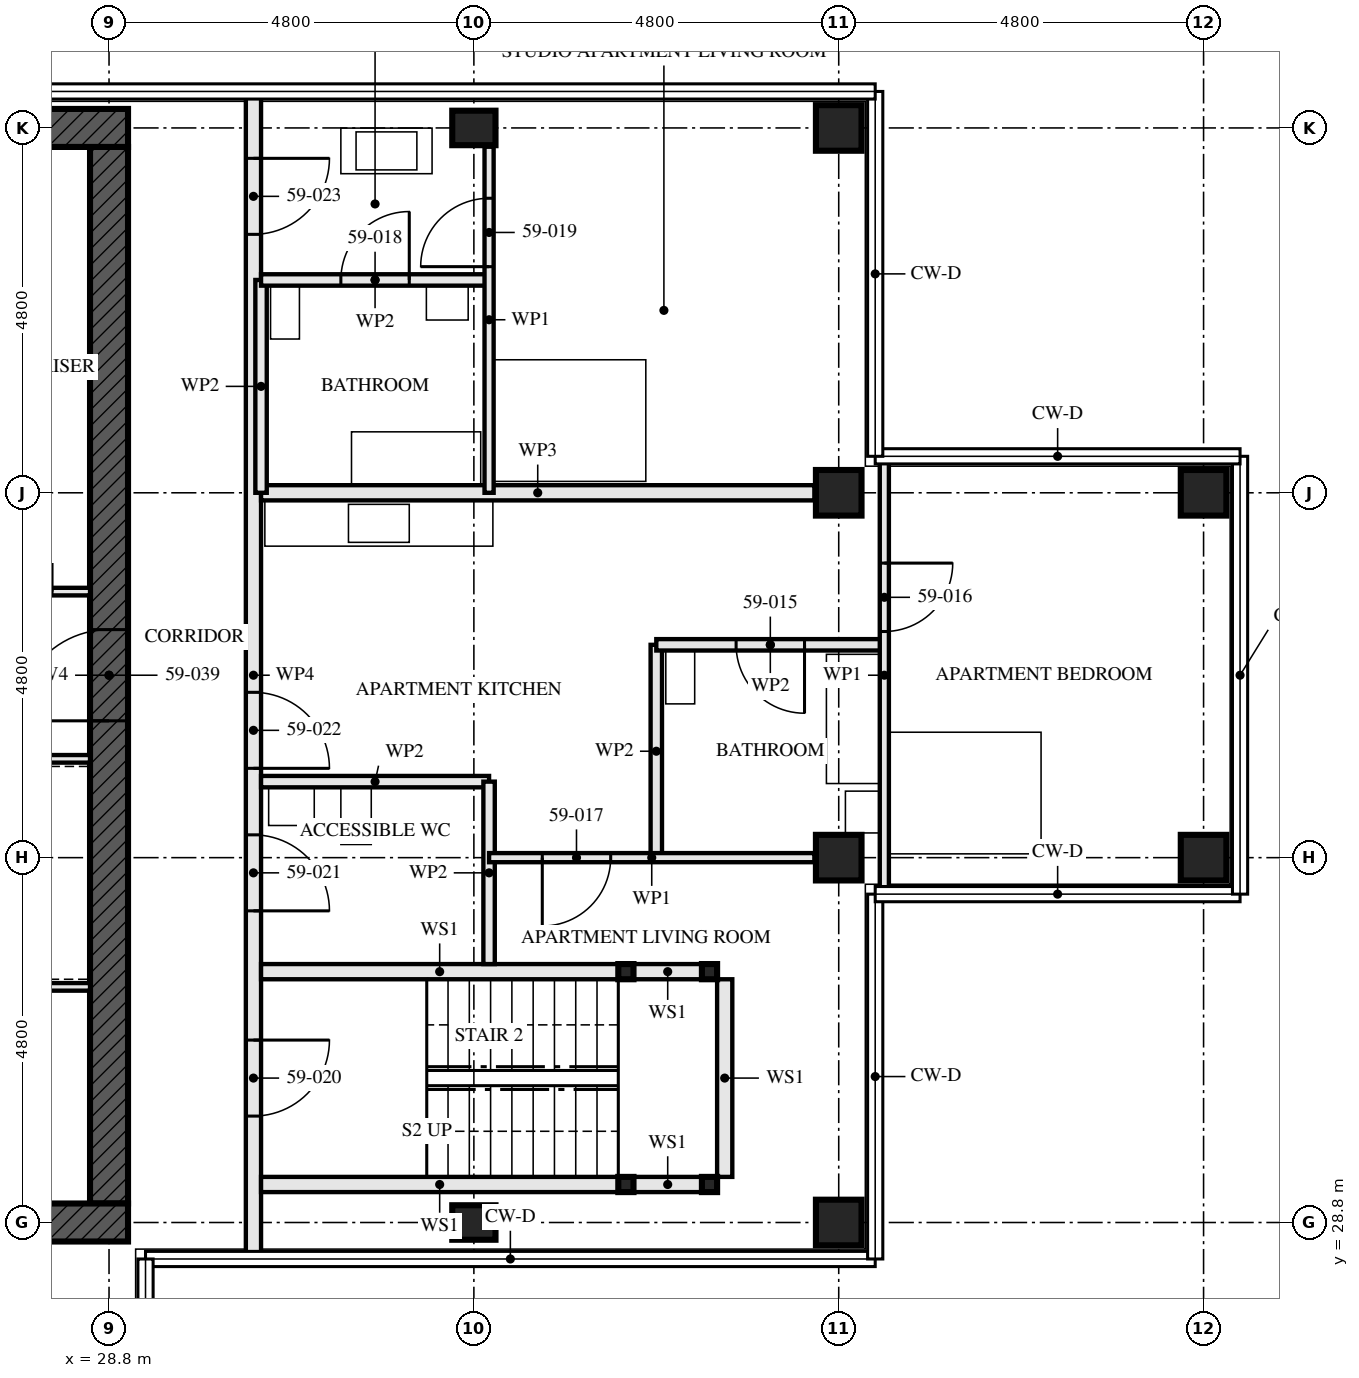
"""IFC4 building model, lengths in metres.
Left out: names, types, materials, properties, quantities, classifications, styles, units other than length and angle.
Written with IfcOpenShell. Run it as: python <this file> out.ifc"""

import sys

from ifc_helpers import new_model, si_unit, direction, frame, frame_2d, origin, origin_2d, place, context, subcontext, project, spatial, rectangle, hollow_rectangle, i_section, extrude, element, fill, save


model = new_model("IFC4")
c1 = context("Model", 3, precision=1e-05, world=origin(), true_north=direction((0.0, 1.0)))
c2 = subcontext(c1, "Body", "Model", "MODEL_VIEW")
j1 = project(units=[si_unit("LENGTHUNIT", "METRE"), si_unit("PLANEANGLEUNIT", "RADIAN")], contexts=[c1])
p1 = place(None, origin())
s1 = spatial("IfcSite", under=j1, at=p1, CompositionType="ELEMENT")
p2 = place(p1, origin())
s2 = spatial("IfcBuilding", under=s1, at=p2, CompositionType="ELEMENT")
p3 = place(p2, frame((0.0, 0.0, 215.5)))
s3 = spatial("IfcBuildingStorey", under=s2, at=p3, CompositionType="ELEMENT", Elevation=215.5)
for number, where, z_axis, x_axis in (
    (1, (33.6, 28.8, 0.0), (0.0, 0.0, 1.0), (0.0, 1.0, 0.0)),
    (2, (33.6, 43.2, 0.0), (0.0, 0.0, 1.0), (0.0, 1.0, 0.0)),
):
    element("IfcColumn", number, at=place(p3, frame(where, z_axis=z_axis, x_axis=x_axis)), inside=s3, PredefinedType="COLUMN", context=c2, shape_type="SweptSolid", body=[
        extrude(i_section(OverallWidth=0.454, OverallDepth=0.569, WebThickness=0.078, FlangeThickness=0.125, FilletRadius=0.015, at=origin_2d()), origin(), (0.0, 0.0, 1.0), 3.5),
    ])
for number, where, z_axis, x_axis in (
    (3, (38.4, 28.8, 0.0), (0.0, 0.0, 1.0), (0.0, 1.0, 0.0)),
    (4, (38.4, 33.6, 0.0), (0.0, 0.0, 1.0), (0.0, 1.0, 0.0)),
    (5, (38.4, 38.4, 0.0), (0.0, 0.0, 1.0), (0.0, 1.0, 0.0)),
    (6, (38.4, 43.2, 0.0), (0.0, 0.0, 1.0), (0.0, 1.0, 0.0)),
    (7, (43.2, 33.6, 0.0), (0.0, 0.0, 1.0), (0.0, 1.0, 0.0)),
    (8, (43.2, 38.4, 0.0), (0.0, 0.0, 1.0), (0.0, 1.0, 0.0)),
):
    element("IfcColumn", number, at=place(p3, frame(where, z_axis=z_axis, x_axis=x_axis)), inside=s3, PredefinedType="COLUMN", context=c2, shape_type="SweptSolid", body=[
        extrude(hollow_rectangle(XDim=0.6, YDim=0.6, WallThickness=0.05, at=origin_2d()), origin(), (0.0, 0.0, 1.0), 3.5),
    ])
p4 = place(p3, frame((14.15, 28.8, -0.17), z_axis=(0.0, 0.0, 1.0), x_axis=(1.0, 0.0, 0.0)))
e9 = element("IfcWall", 9, at=p4, inside=s3, PredefinedType="SHEAR", context=c2, shape_type="SweptSolid", body=[
    extrude(rectangle(XDim=14.9, YDim=0.5, at=frame_2d((7.45, 0.0))), origin(), (0.0, 0.0, 1.0), 3.5),
])
p5 = place(p4, frame((6.85, 0.0, 0.17)))
e10 = element("IfcOpeningElement", 10, at=p5, cuts=e9, PredefinedType="OPENING", context=c2, shape_type="SweptSolid", body=[
    extrude(rectangle(XDim=1.2, YDim=2.1, at=frame_2d((0.6, 1.05))), frame((0.0, 0.26, 0.0), z_axis=(0.0, -1.0, 0.0), x_axis=(1.0, 0.0, 0.0)), (0.0, 0.0, 1.0), 0.521),
])
p6 = place(p3, frame((29.05, 43.2, -0.17), z_axis=(0.0, 0.0, 1.0), x_axis=(-1.0, 0.0, 0.0)))
e11 = element("IfcWall", 11, at=p6, inside=s3, PredefinedType="SHEAR", context=c2, shape_type="SweptSolid", body=[
    extrude(rectangle(XDim=14.9, YDim=0.5, at=frame_2d((7.45, 0.0))), origin(), (0.0, 0.0, 1.0), 3.5),
])
p7 = place(p3, frame((28.8, 29.05, -0.17), z_axis=(0.0, 0.0, 1.0), x_axis=(0.0, 1.0, 0.0)))
e12 = element("IfcWall", 12, at=p7, inside=s3, PredefinedType="SHEAR", context=c2, shape_type="SweptSolid", body=[
    extrude(rectangle(XDim=13.9, YDim=0.5, at=frame_2d((6.95, 0.0))), origin(), (0.0, 0.0, 1.0), 3.5),
])
p8 = place(p7, frame((6.35, 0.0, 0.17)))
e13 = element("IfcOpeningElement", 13, at=p8, cuts=e12, PredefinedType="OPENING", context=c2, shape_type="SweptSolid", body=[
    extrude(rectangle(XDim=1.2, YDim=2.1, at=frame_2d((0.6, 1.05))), frame((0.0, 0.26, 0.0), z_axis=(0.0, -1.0, 0.0), x_axis=(1.0, 0.0, 0.0)), (0.0, 0.0, 1.0), 0.521),
])
for number, where, z_axis, x_axis in (
    (14, (36.7, 29.3, 0.0), (0.0, 0.0, 1.0), (1.0, 0.0, 0.0)),
    (15, (36.7, 32.1, 0.0), (0.0, 0.0, 1.0), (1.0, 0.0, 0.0)),
    (16, (35.6, 29.3, 0.0), (0.0, 0.0, 1.0), (1.0, 0.0, 0.0)),
    (17, (35.6, 32.1, 0.0), (0.0, 0.0, 1.0), (1.0, 0.0, 0.0)),
):
    element("IfcColumn", number, at=place(p3, frame(where, z_axis=z_axis, x_axis=x_axis)), inside=s3, PredefinedType="COLUMN", context=c2, shape_type="SweptSolid", body=[
        extrude(hollow_rectangle(XDim=0.2, YDim=0.2, WallThickness=0.008, at=origin_2d()), origin(), (0.0, 0.0, 1.0), 3.33),
    ])
p9 = place(p3, frame((36.6, 29.3, 0.0), z_axis=(0.0, 0.0, 1.0), x_axis=(-1.0, 0.0, 0.0)))
e18 = element("IfcWall", 18, at=p9, inside=s3, PredefinedType="SOLIDWALL", context=c2, shape_type="SweptSolid", body=[
    extrude(rectangle(XDim=0.9, YDim=0.2, at=frame_2d((0.45, 0.0))), origin(), (0.0, 0.0, 1.0), 2.99),
])
p10 = place(p3, frame((35.5, 29.3, 0.0), z_axis=(0.0, 0.0, 1.0), x_axis=(-1.0, 0.0, 0.0)))
e19 = element("IfcWall", 19, at=p10, inside=s3, PredefinedType="SOLIDWALL", context=c2, shape_type="SweptSolid", body=[
    extrude(rectangle(XDim=4.7, YDim=0.2, at=frame_2d((2.35, 0.0))), origin(), (0.0, 0.0, 1.0), 2.99),
])
p11 = place(p3, frame((36.6, 32.1, 0.0), z_axis=(0.0, 0.0, 1.0), x_axis=(-1.0, 0.0, 0.0)))
e20 = element("IfcWall", 20, at=p11, inside=s3, PredefinedType="SOLIDWALL", context=c2, shape_type="SweptSolid", body=[
    extrude(rectangle(XDim=0.9, YDim=0.2, at=frame_2d((0.45, 0.0))), origin(), (0.0, 0.0, 1.0), 2.99),
])
p12 = place(p3, frame((35.5, 32.1, 0.0), z_axis=(0.0, 0.0, 1.0), x_axis=(-1.0, 0.0, 0.0)))
e21 = element("IfcWall", 21, at=p12, inside=s3, PredefinedType="SOLIDWALL", context=c2, shape_type="SweptSolid", body=[
    extrude(rectangle(XDim=4.7, YDim=0.2, at=frame_2d((2.35, 0.0))), origin(), (0.0, 0.0, 1.0), 2.99),
])
p13 = place(p3, frame((36.9, 29.4, 0.0), z_axis=(0.0, 0.0, 1.0), x_axis=(0.0, 1.0, 0.0)))
e22 = element("IfcWall", 22, at=p13, inside=s3, PredefinedType="SOLIDWALL", context=c2, shape_type="SweptSolid", body=[
    extrude(rectangle(XDim=2.6, YDim=0.2, at=frame_2d((1.3, 0.0))), origin(), (0.0, 0.0, 1.0), 3.33),
])
p14 = place(p3, frame((33.8, 32.2, 0.0), z_axis=(0.0, 0.0, 1.0), x_axis=(0.0, 1.0, 0.0)))
e23 = element("IfcWall", 23, at=p14, inside=s3, PredefinedType="PARTITIONING", context=c2, shape_type="SweptSolid", body=[
    extrude(rectangle(XDim=2.4, YDim=0.15, at=frame_2d((1.2, 0.0))), origin(), (0.0, 0.0, 1.0), 2.55),
])
p15 = place(p3, frame((33.8, 34.6, 0.0), z_axis=(0.0, 0.0, 1.0), x_axis=(-1.0, 0.0, 0.0)))
e24 = element("IfcWall", 24, at=p15, inside=s3, PredefinedType="PARTITIONING", context=c2, shape_type="SweptSolid", body=[
    extrude(rectangle(XDim=3.0, YDim=0.15, at=frame_2d((1.5, 0.0))), origin(), (0.0, 0.0, 1.0), 3.33),
])
p16 = place(p3, frame((39.0, 36.4, 0.0), z_axis=(0.0, 0.0, 1.0), x_axis=(-1.0, 0.0, 0.0)))
e25 = element("IfcWall", 25, at=p16, inside=s3, PredefinedType="PARTITIONING", context=c2, shape_type="SweptSolid", body=[
    extrude(rectangle(XDim=3.0, YDim=0.15, at=frame_2d((1.5, 0.0))), origin(), (0.0, 0.0, 1.0), 3.33),
])
p17 = place(p16, frame((1.05, 0.0, 0.0)))
e26 = element("IfcOpeningElement", 26, at=p17, cuts=e25, PredefinedType="OPENING", context=c2, shape_type="SweptSolid", body=[
    extrude(rectangle(XDim=0.9, YDim=2.1, at=frame_2d((0.45, 1.05))), frame((0.0, 0.085, 0.0), z_axis=(0.0, -1.0, 0.0), x_axis=(1.0, 0.0, 0.0)), (0.0, 0.0, 1.0), 0.171),
])
p18 = place(p3, frame((36.0, 33.6, 0.0), z_axis=(0.0, 0.0, 1.0), x_axis=(0.0, 1.0, 0.0)))
e27 = element("IfcWall", 27, at=p18, inside=s3, PredefinedType="PARTITIONING", context=c2, shape_type="SweptSolid", body=[
    extrude(rectangle(XDim=2.8, YDim=0.15, at=frame_2d((1.4, 0.0))), origin(), (0.0, 0.0, 1.0), 3.33),
])
p19 = place(p3, frame((39.0, 33.145, 0.0), z_axis=(0.0, 0.0, 1.0), x_axis=(0.0, 1.0, 0.0)))
e28 = element("IfcWall", 28, at=p19, inside=s3, PredefinedType="PARTITIONING", context=c2, shape_type="SweptSolid", body=[
    extrude(rectangle(XDim=5.71, YDim=0.12, at=frame_2d((2.855, 0.0))), origin(), (0.0, 0.0, 1.0), 2.32),
])
p20 = place(p19, frame((3.43, 0.0, 0.0)))
e29 = element("IfcOpeningElement", 29, at=p20, cuts=e28, PredefinedType="OPENING", context=c2, shape_type="SweptSolid", body=[
    extrude(rectangle(XDim=0.9, YDim=2.1, at=frame_2d((0.45, 1.05))), frame((0.0, 0.071, 0.0), z_axis=(0.0, -1.0, 0.0), x_axis=(1.0, 0.0, 0.0)), (0.0, 0.0, 1.0), 0.141),
])
p21 = place(p3, frame((38.08, 33.6, 0.0), z_axis=(0.0, 0.0, 1.0), x_axis=(-1.0, 0.0, 0.0)))
e30 = element("IfcWall", 30, at=p21, inside=s3, PredefinedType="PARTITIONING", context=c2, shape_type="SweptSolid", body=[
    extrude(rectangle(XDim=4.28, YDim=0.12, at=frame_2d((2.14, 0.0))), origin(), (0.0, 0.0, 1.0), 2.55),
])
p22 = place(p21, frame((2.68, 0.0, 0.0)))
e31 = element("IfcOpeningElement", 31, at=p22, cuts=e30, PredefinedType="OPENING", context=c2, shape_type="SweptSolid", body=[
    extrude(rectangle(XDim=0.9, YDim=2.1, at=frame_2d((0.45, 1.05))), frame((0.0, 0.071, 0.0), z_axis=(0.0, -1.0, 0.0), x_axis=(1.0, 0.0, 0.0)), (0.0, 0.0, 1.0), 0.141),
])
p23 = place(p3, frame((38.08, 38.4, 0.0), z_axis=(0.0, 0.0, 1.0), x_axis=(-1.0, 0.0, 0.0)))
e32 = element("IfcWall", 32, at=p23, inside=s3, PredefinedType="PARTITIONING", context=c2, shape_type="SweptSolid", body=[
    extrude(rectangle(XDim=7.28, YDim=0.2, at=frame_2d((3.64, 0.0))), origin(), (0.0, 0.0, 1.0), 2.55),
])
p24 = place(p3, frame((33.8, 41.2, 0.0), z_axis=(0.0, 0.0, 1.0), x_axis=(-1.0, 0.0, 0.0)))
e33 = element("IfcWall", 33, at=p24, inside=s3, PredefinedType="PARTITIONING", context=c2, shape_type="SweptSolid", body=[
    extrude(rectangle(XDim=3.0, YDim=0.15, at=frame_2d((1.5, 0.0))), origin(), (0.0, 0.0, 1.0), 3.33),
])
p25 = place(p24, frame((1.05, 0.0, 0.0)))
e34 = element("IfcOpeningElement", 34, at=p25, cuts=e33, PredefinedType="OPENING", context=c2, shape_type="SweptSolid", body=[
    extrude(rectangle(XDim=0.9, YDim=2.1, at=frame_2d((0.45, 1.05))), frame((0.0, 0.085, 0.0), z_axis=(0.0, -1.0, 0.0), x_axis=(1.0, 0.0, 0.0)), (0.0, 0.0, 1.0), 0.171),
])
p26 = place(p3, frame((30.8, 38.4, 0.0), z_axis=(0.0, 0.0, 1.0), x_axis=(0.0, 1.0, 0.0)))
e35 = element("IfcWall", 35, at=p26, inside=s3, PredefinedType="PARTITIONING", context=c2, shape_type="SweptSolid", body=[
    extrude(rectangle(XDim=2.8, YDim=0.15, at=frame_2d((1.4, 0.0))), origin(), (0.0, 0.0, 1.0), 3.33),
])
p27 = place(p3, frame((33.8, 38.4, 0.0), z_axis=(0.0, 0.0, 1.0), x_axis=(0.0, 1.0, 0.0)))
e36 = element("IfcWall", 36, at=p27, inside=s3, PredefinedType="PARTITIONING", context=c2, shape_type="SweptSolid", body=[
    extrude(rectangle(XDim=4.553, YDim=0.12, at=frame_2d((2.276, 0.0))), origin(), (0.0, 0.0, 1.0), 3.33),
])
p28 = place(p27, frame((2.975, 0.0, 0.0)))
e37 = element("IfcOpeningElement", 37, at=p28, cuts=e36, PredefinedType="OPENING", context=c2, shape_type="SweptSolid", body=[
    extrude(rectangle(XDim=0.9, YDim=2.1, at=frame_2d((0.45, 1.05))), frame((0.0, 0.071, 0.0), z_axis=(0.0, -1.0, 0.0), x_axis=(1.0, 0.0, 0.0)), (0.0, 0.0, 1.0), 0.141),
])
p29 = place(p3, frame((30.7, 28.345, 0.0), z_axis=(0.0, 0.0, 1.0), x_axis=(0.0, 1.0, 0.0)))
e38 = element("IfcWall", 38, at=p29, inside=s3, PredefinedType="PARTITIONING", context=c2, shape_type="SweptSolid", body=[
    extrude(rectangle(XDim=15.31, YDim=0.2, at=frame_2d((7.655, 0.0))), origin(), (0.0, 0.0, 1.0), 2.32),
])
p30 = place(p29, frame((1.855, 0.0, 0.0)))
e39 = element("IfcOpeningElement", 39, at=p30, cuts=e38, PredefinedType="OPENING", context=c2, shape_type="SweptSolid", body=[
    extrude(rectangle(XDim=1.0, YDim=2.1, at=frame_2d((0.5, 1.05))), frame((0.0, 0.111, 0.0), z_axis=(0.0, -1.0, 0.0), x_axis=(1.0, 0.0, 0.0)), (0.0, 0.0, 1.0), 0.221),
])
p31 = place(p29, frame((4.555, 0.0, 0.0)))
e40 = element("IfcOpeningElement", 40, at=p31, cuts=e38, PredefinedType="OPENING", context=c2, shape_type="SweptSolid", body=[
    extrude(rectangle(XDim=1.0, YDim=2.1, at=frame_2d((0.5, 1.05))), frame((0.0, 0.111, 0.0), z_axis=(0.0, -1.0, 0.0), x_axis=(1.0, 0.0, 0.0)), (0.0, 0.0, 1.0), 0.221),
])
p32 = place(p29, frame((6.43, 0.0, 0.0)))
e41 = element("IfcOpeningElement", 41, at=p32, cuts=e38, PredefinedType="OPENING", context=c2, shape_type="SweptSolid", body=[
    extrude(rectangle(XDim=1.0, YDim=2.1, at=frame_2d((0.5, 1.05))), frame((0.0, 0.111, 0.0), z_axis=(0.0, -1.0, 0.0), x_axis=(1.0, 0.0, 0.0)), (0.0, 0.0, 1.0), 0.221),
])
p33 = place(p29, frame((13.455, 0.0, 0.0)))
e42 = element("IfcOpeningElement", 42, at=p33, cuts=e38, PredefinedType="OPENING", context=c2, shape_type="SweptSolid", body=[
    extrude(rectangle(XDim=1.0, YDim=2.1, at=frame_2d((0.5, 1.05))), frame((0.0, 0.111, 0.0), z_axis=(0.0, -1.0, 0.0), x_axis=(1.0, 0.0, 0.0)), (0.0, 0.0, 1.0), 0.221),
])
p34 = place(p3, frame((23.05, 34.9, 0.0), z_axis=(0.0, 0.0, 1.0), x_axis=(1.0, 0.0, 0.0)))
e43 = element("IfcWall", 43, at=p34, inside=s3, PredefinedType="SOLIDWALL", context=c2, shape_type="SweptSolid", body=[
    extrude(rectangle(XDim=5.5, YDim=0.1, at=frame_2d((2.75, 0.0))), origin(), (0.0, 0.0, 1.0), 3.33),
])
p35 = place(p34, frame((0.85, 0.0, 0.0)))
e44 = element("IfcOpeningElement", 44, at=p35, cuts=e43, PredefinedType="OPENING", context=c2, shape_type="SweptSolid", body=[
    extrude(rectangle(XDim=1.0, YDim=2.1, at=frame_2d((0.5, 1.05))), frame((0.0, 0.061, 0.0), z_axis=(0.0, -1.0, 0.0), x_axis=(1.0, 0.0, 0.0)), (0.0, 0.0, 1.0), 0.121),
])
p36 = place(p34, frame((3.625, 0.0, 0.0)))
e45 = element("IfcOpeningElement", 45, at=p36, cuts=e43, PredefinedType="OPENING", context=c2, shape_type="SweptSolid", body=[
    extrude(rectangle(XDim=1.0, YDim=2.1, at=frame_2d((0.5, 1.05))), frame((0.0, 0.061, 0.0), z_axis=(0.0, -1.0, 0.0), x_axis=(1.0, 0.0, 0.0)), (0.0, 0.0, 1.0), 0.121),
])
p37 = place(p3, frame((22.65, 37.1, 0.0), z_axis=(0.0, 0.0, 1.0), x_axis=(1.0, 0.0, 0.0)))
e46 = element("IfcWall", 46, at=p37, inside=s3, PredefinedType="SOLIDWALL", context=c2, shape_type="SweptSolid", body=[
    extrude(rectangle(XDim=5.9, YDim=0.1, at=frame_2d((2.95, 0.0))), origin(), (0.0, 0.0, 1.0), 3.33),
])
p38 = place(p37, frame((3.15, 0.0, 0.0)))
e47 = element("IfcOpeningElement", 47, at=p38, cuts=e46, PredefinedType="OPENING", context=c2, shape_type="SweptSolid", body=[
    extrude(rectangle(XDim=0.9, YDim=2.1, at=frame_2d((0.45, 1.05))), frame((0.0, 0.061, 0.0), z_axis=(0.0, -1.0, 0.0), x_axis=(1.0, 0.0, 0.0)), (0.0, 0.0, 1.0), 0.121),
])
p39 = place(p37, frame((4.7, 0.0, 0.0)))
e48 = element("IfcOpeningElement", 48, at=p39, cuts=e46, PredefinedType="OPENING", context=c2, shape_type="SweptSolid", body=[
    extrude(rectangle(XDim=0.7, YDim=2.1, at=frame_2d((0.35, 1.05))), frame((0.0, 0.061, 0.0), z_axis=(0.0, -1.0, 0.0), x_axis=(1.0, 0.0, 0.0)), (0.0, 0.0, 1.0), 0.121),
])
p40 = place(p3, frame((23.15, 31.9, 0.0), z_axis=(0.0, 0.0, 1.0), x_axis=(1.0, 0.0, 0.0)))
e49 = element("IfcWall", 49, at=p40, inside=s3, PredefinedType="SOLIDWALL", context=c2, shape_type="SweptSolid", body=[
    extrude(rectangle(XDim=5.4, YDim=0.1, at=frame_2d((2.7, 0.0))), origin(), (0.0, 0.0, 1.0), 3.33),
])
p41 = place(p17, origin())
e50 = element("IfcDoor", 50, at=p41, inside=s3, OperationType="SINGLE_SWING_RIGHT", PredefinedType="DOOR", context=c2, shape_type="SweptSolid", body=[
    extrude(rectangle(XDim=0.9, YDim=2.1, at=frame_2d((0.45, 1.05))), frame((0.0, 0.022, 0.0), z_axis=(0.0, -1.0, 0.0), x_axis=(1.0, 0.0, 0.0)), (0.0, 0.0, 1.0), 0.044),
])
fill(e26, e50)
p42 = place(p20, frame((0.9, 0.0, 0.0), z_axis=(0.0, 0.0, 1.0), x_axis=(-1.0, 0.0, 0.0)))
e51 = element("IfcDoor", 51, at=p42, inside=s3, OperationType="SINGLE_SWING_RIGHT", PredefinedType="DOOR", context=c2, shape_type="SweptSolid", body=[
    extrude(rectangle(XDim=0.9, YDim=2.1, at=frame_2d((0.45, 1.05))), frame((0.0, 0.022, 0.0), z_axis=(0.0, -1.0, 0.0), x_axis=(1.0, 0.0, 0.0)), (0.0, 0.0, 1.0), 0.044),
])
fill(e29, e51)
p43 = place(p22, origin())
e52 = element("IfcDoor", 52, at=p43, inside=s3, OperationType="SINGLE_SWING_LEFT", PredefinedType="DOOR", context=c2, shape_type="SweptSolid", body=[
    extrude(rectangle(XDim=0.9, YDim=2.1, at=frame_2d((0.45, 1.05))), frame((0.0, 0.022, 0.0), z_axis=(0.0, -1.0, 0.0), x_axis=(1.0, 0.0, 0.0)), (0.0, 0.0, 1.0), 0.044),
])
fill(e31, e52)
p44 = place(p25, frame((0.9, 0.0, 0.0), z_axis=(0.0, 0.0, 1.0), x_axis=(-1.0, 0.0, 0.0)))
e53 = element("IfcDoor", 53, at=p44, inside=s3, OperationType="SINGLE_SWING_LEFT", PredefinedType="DOOR", context=c2, shape_type="SweptSolid", body=[
    extrude(rectangle(XDim=0.9, YDim=2.1, at=frame_2d((0.45, 1.05))), frame((0.0, 0.022, 0.0), z_axis=(0.0, -1.0, 0.0), x_axis=(1.0, 0.0, 0.0)), (0.0, 0.0, 1.0), 0.044),
])
fill(e34, e53)
p45 = place(p28, origin())
e54 = element("IfcDoor", 54, at=p45, inside=s3, OperationType="SINGLE_SWING_RIGHT", PredefinedType="DOOR", context=c2, shape_type="SweptSolid", body=[
    extrude(rectangle(XDim=0.9, YDim=2.1, at=frame_2d((0.45, 1.05))), frame((0.0, 0.022, 0.0), z_axis=(0.0, -1.0, 0.0), x_axis=(1.0, 0.0, 0.0)), (0.0, 0.0, 1.0), 0.044),
])
fill(e37, e54)
p46 = place(p30, frame((1.0, 0.0, 0.0), z_axis=(0.0, 0.0, 1.0), x_axis=(-1.0, 0.0, 0.0)))
e55 = element("IfcDoor", 55, at=p46, inside=s3, OperationType="SINGLE_SWING_RIGHT", PredefinedType="DOOR", context=c2, shape_type="SweptSolid", body=[
    extrude(rectangle(XDim=1.0, YDim=2.1, at=frame_2d((0.5, 1.05))), frame((0.0, 0.032, 0.0), z_axis=(0.0, -1.0, 0.0), x_axis=(1.0, 0.0, 0.0)), (0.0, 0.0, 1.0), 0.064),
])
fill(e39, e55)
p47 = place(p31, frame((1.0, 0.0, 0.0), z_axis=(0.0, 0.0, 1.0), x_axis=(-1.0, 0.0, 0.0)))
e56 = element("IfcDoor", 56, at=p47, inside=s3, OperationType="SINGLE_SWING_LEFT", PredefinedType="DOOR", context=c2, shape_type="SweptSolid", body=[
    extrude(rectangle(XDim=1.0, YDim=2.1, at=frame_2d((0.5, 1.05))), frame((0.0, 0.027, 0.0), z_axis=(0.0, -1.0, 0.0), x_axis=(1.0, 0.0, 0.0)), (0.0, 0.0, 1.0), 0.054),
])
fill(e40, e56)
p48 = place(p32, frame((1.0, 0.0, 0.0), z_axis=(0.0, 0.0, 1.0), x_axis=(-1.0, 0.0, 0.0)))
e57 = element("IfcDoor", 57, at=p48, inside=s3, OperationType="SINGLE_SWING_LEFT", PredefinedType="DOOR", context=c2, shape_type="SweptSolid", body=[
    extrude(rectangle(XDim=1.0, YDim=2.1, at=frame_2d((0.5, 1.05))), frame((0.0, 0.027, 0.0), z_axis=(0.0, -1.0, 0.0), x_axis=(1.0, 0.0, 0.0)), (0.0, 0.0, 1.0), 0.054),
])
fill(e41, e57)
p49 = place(p33, frame((1.0, 0.0, 0.0), z_axis=(0.0, 0.0, 1.0), x_axis=(-1.0, 0.0, 0.0)))
e58 = element("IfcDoor", 58, at=p49, inside=s3, OperationType="SINGLE_SWING_RIGHT", PredefinedType="DOOR", context=c2, shape_type="SweptSolid", body=[
    extrude(rectangle(XDim=1.0, YDim=2.1, at=frame_2d((0.5, 1.05))), frame((0.0, 0.027, 0.0), z_axis=(0.0, -1.0, 0.0), x_axis=(1.0, 0.0, 0.0)), (0.0, 0.0, 1.0), 0.054),
])
fill(e42, e58)
p50 = place(p8, origin())
e59 = element("IfcDoor", 59, at=p50, inside=s3, OperationType="SINGLE_SWING_LEFT", PredefinedType="DOOR", context=c2, shape_type="SweptSolid", body=[
    extrude(rectangle(XDim=1.2, YDim=2.1, at=frame_2d((0.6, 1.05))), frame((0.0, 0.027, 0.0), z_axis=(0.0, -1.0, 0.0), x_axis=(1.0, 0.0, 0.0)), (0.0, 0.0, 1.0), 0.054),
])
fill(e13, e59)
save(model, sys.argv[1])
